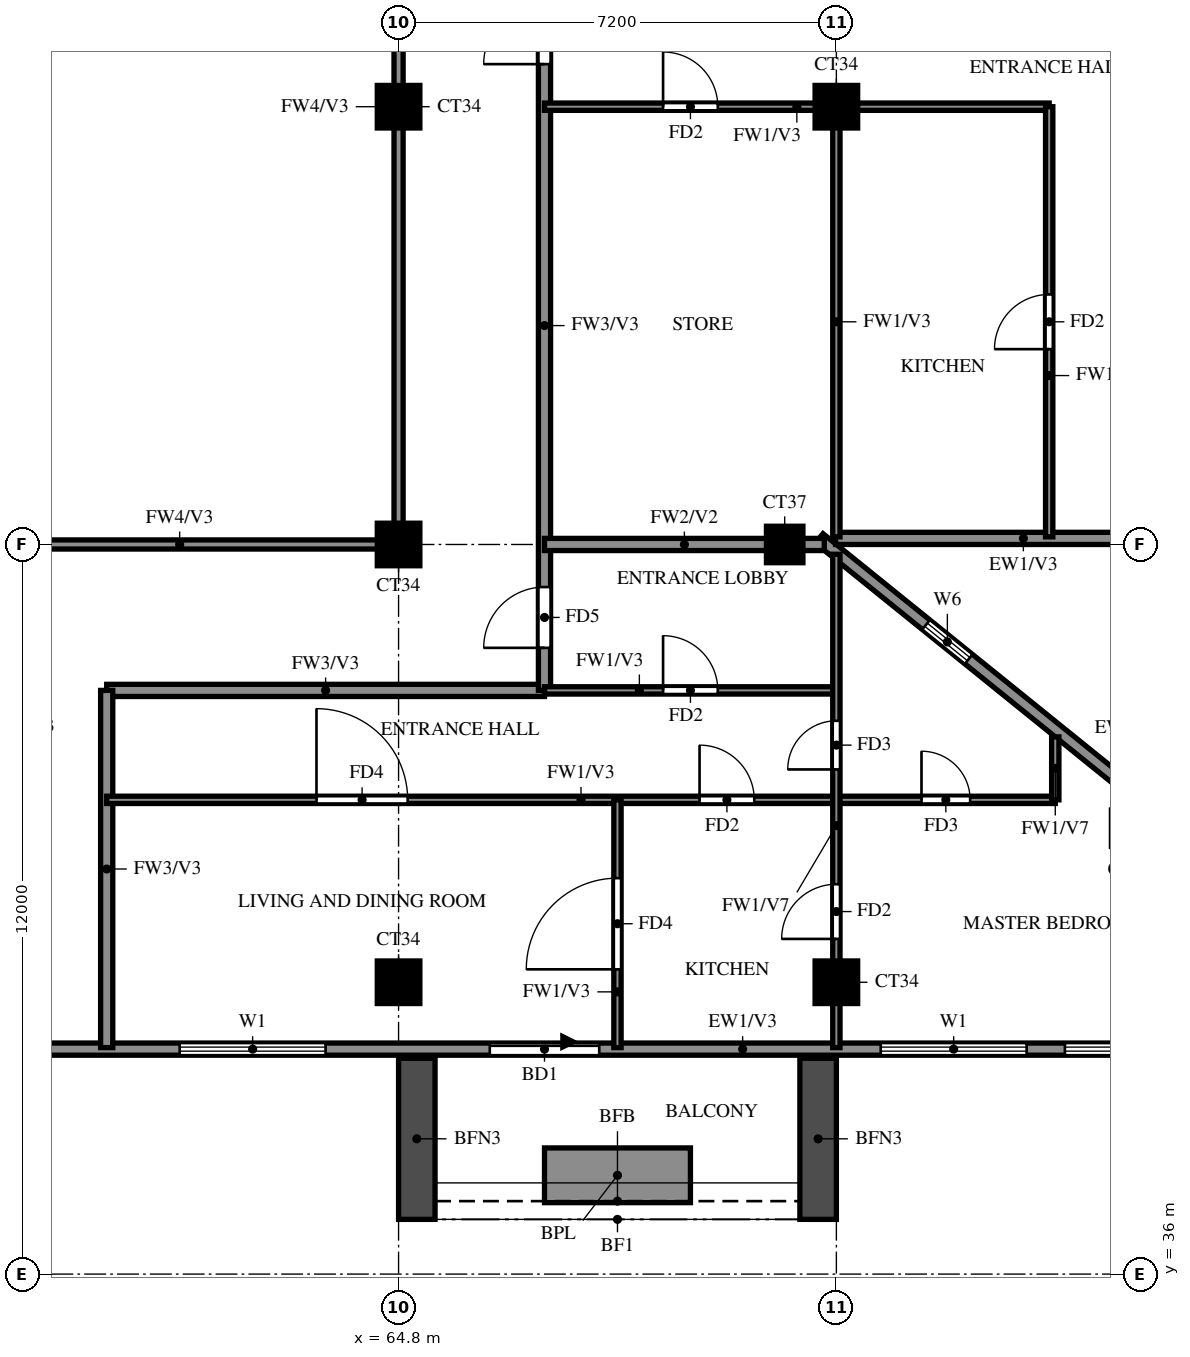
"""IFC4 building model, lengths in metres.
Left out: names, types, materials, properties, quantities, classifications, styles, units other than length and angle.
Written with IfcOpenShell. Run it as: python <this file> out.ifc"""

import sys

from ifc_helpers import new_model, si_unit, direction, frame, frame_2d, origin, origin_2d, place, context, subcontext, project, spatial, rectangle, extrude, source, transform, mapped, element, fill, save


model = new_model("IFC4")
c1 = context("Model", 3, precision=1e-05, world=origin(), true_north=direction((0.0, 1.0)))
c2 = subcontext(c1, "Body", "Model", "MODEL_VIEW")
j1 = project(units=[si_unit("LENGTHUNIT", "METRE"), si_unit("PLANEANGLEUNIT", "RADIAN")], contexts=[c1])
p1 = place(None, origin())
s1 = spatial("IfcSite", under=j1, at=p1, CompositionType="ELEMENT")
p2 = place(p1, origin())
s2 = spatial("IfcBuilding", under=s1, at=p2, CompositionType="ELEMENT")
p3 = place(p2, frame((0.0, 0.0, 253.5)))
s3 = spatial("IfcBuildingStorey", under=s2, at=p3, CompositionType="ELEMENT", Elevation=253.5)
m1 = source(origin(), c2, "Body", "SweptSolid", [
    extrude(rectangle(XDim=0.7, YDim=0.7, at=origin_2d()), origin(), (0.0, 0.0, 1.0), 3.22),
])
for number, where, z_axis, x_axis in (
    (1, (64.8, 40.8, 0.0), (0.0, 0.0, 1.0), (1.0, 0.0, 0.0)),
    (2, (72.0, 40.8, 0.0), (0.0, 0.0, 1.0), (1.0, 0.0, 0.0)),
    (3, (64.8, 48.0, 0.0), (0.0, 0.0, 1.0), (1.0, 0.0, 0.0)),
):
    element("IfcColumn", number, at=place(p3, frame(where, z_axis=z_axis, x_axis=x_axis)), inside=s3, PredefinedType="COLUMN", context=c2, shape_type="MappedRepresentation", body=[
        mapped(m1, transform((0.0, 0.0, 0.0))),
    ])
m2 = source(origin(), c2, "Body", "SweptSolid", [
    extrude(rectangle(XDim=0.6, YDim=0.6, at=origin_2d()), origin(), (0.0, 0.0, 1.0), 3.22),
])
p4 = place(p3, frame((71.15, 48.0, 0.0), z_axis=(0.0, 0.0, 1.0), x_axis=(1.0, 0.0, 0.0)))
e4 = element("IfcColumn", 4, at=p4, inside=s3, PredefinedType="COLUMN", context=c2, shape_type="MappedRepresentation", body=[
    mapped(m2, transform((0.0, 0.0, 0.0))),
])
for number, where, z_axis, x_axis in (
    (5, (64.8, 55.2, 0.0), (0.0, 0.0, 1.0), (1.0, 0.0, 0.0)),
    (6, (72.0, 55.2, 0.0), (0.0, 0.0, 1.0), (1.0, 0.0, 0.0)),
):
    element("IfcColumn", number, at=place(p3, frame(where, z_axis=z_axis, x_axis=x_axis)), inside=s3, PredefinedType="COLUMN", context=c2, shape_type="MappedRepresentation", body=[
        mapped(m1, transform((0.0, 0.0, 0.0))),
    ])
p5 = place(p3, frame((81.907, 39.87, 0.0), z_axis=(0.0, 0.0, 1.0), x_axis=(-0.777936274417, 0.62834318087, 0.0)))
e7 = element("IfcWall", 7, at=p5, inside=s3, PredefinedType="SOLIDWALL", context=c2, shape_type="SweptSolid", body=[
    extrude(rectangle(XDim=13.099, YDim=0.2, at=frame_2d((6.549, 0.0))), origin(), (0.0, 0.0, 1.0), 3.22),
])
p6 = place(p5, frame((9.938, 0.0, 1.5)))
e8 = element("IfcOpeningElement", 8, at=p6, cuts=e7, PredefinedType="OPENING", context=c2, shape_type="SweptSolid", body=[
    extrude(rectangle(XDim=0.9, YDim=0.9, at=frame_2d((0.45, 0.45))), frame((0.0, 0.11, 0.0), z_axis=(0.0, -1.0, 0.0), x_axis=(1.0, 0.0, 0.0)), (0.0, 0.0, 1.0), 0.22),
])
p7 = place(p3, frame((71.987, 48.1, 0.0), z_axis=(0.0, 0.0, 1.0), x_axis=(1.0, 0.0, 0.0)))
e9 = element("IfcWall", 9, at=p7, inside=s3, PredefinedType="SOLIDWALL", context=c2, shape_type="SweptSolid", body=[
    extrude(rectangle(XDim=6.863, YDim=0.2, at=frame_2d((3.432, 0.0))), origin(), (0.0, 0.0, 1.0), 3.22),
])
p8 = place(p3, frame((58.8, 39.7, 0.0), z_axis=(0.0, 0.0, 1.0), x_axis=(1.0, 0.0, 0.0)))
e10 = element("IfcWall", 10, at=p8, inside=s3, PredefinedType="SOLIDWALL", context=c2, shape_type="SweptSolid", body=[
    extrude(rectangle(XDim=23.317, YDim=0.2, at=frame_2d((11.658, 0.0))), origin(), (0.0, 0.0, 1.0), 3.22),
])
p9 = place(p8, frame((7.5, 0.0, 0.0)))
e11 = element("IfcOpeningElement", 11, at=p9, cuts=e10, PredefinedType="OPENING", context=c2, shape_type="SweptSolid", body=[
    extrude(rectangle(XDim=1.8, YDim=2.4, at=frame_2d((0.9, 1.2))), frame((0.0, 0.11, 0.0), z_axis=(0.0, -1.0, 0.0), x_axis=(1.0, 0.0, 0.0)), (0.0, 0.0, 1.0), 0.22),
])
p10 = place(p8, frame((2.4, 0.0, 0.6)))
e12 = element("IfcOpeningElement", 12, at=p10, cuts=e10, PredefinedType="OPENING", context=c2, shape_type="SweptSolid", body=[
    extrude(rectangle(XDim=2.4, YDim=2.4, at=frame_2d((1.2, 1.2))), frame((0.0, 0.11, 0.0), z_axis=(0.0, -1.0, 0.0), x_axis=(1.0, 0.0, 0.0)), (0.0, 0.0, 1.0), 0.22),
])
p11 = place(p8, frame((13.929, 0.0, 0.6)))
e13 = element("IfcOpeningElement", 13, at=p11, cuts=e10, PredefinedType="OPENING", context=c2, shape_type="SweptSolid", body=[
    extrude(rectangle(XDim=2.4, YDim=2.4, at=frame_2d((1.2, 1.2))), frame((0.0, 0.11, 0.0), z_axis=(0.0, -1.0, 0.0), x_axis=(1.0, 0.0, 0.0)), (0.0, 0.0, 1.0), 0.22),
])
p12 = place(p8, frame((16.958, 0.0, 0.6)))
e14 = element("IfcOpeningElement", 14, at=p12, cuts=e10, PredefinedType="OPENING", context=c2, shape_type="SweptSolid", body=[
    extrude(rectangle(XDim=2.4, YDim=2.4, at=frame_2d((1.2, 1.2))), frame((0.0, 0.11, 0.0), z_axis=(0.0, -1.0, 0.0), x_axis=(1.0, 0.0, 0.0)), (0.0, 0.0, 1.0), 0.22),
])
p13 = place(p8, frame((19.988, 0.0, 0.6)))
e15 = element("IfcOpeningElement", 15, at=p13, cuts=e10, PredefinedType="OPENING", context=c2, shape_type="SweptSolid", body=[
    extrude(rectangle(XDim=2.4, YDim=2.4, at=frame_2d((1.2, 1.2))), frame((0.0, 0.11, 0.0), z_axis=(0.0, -1.0, 0.0), x_axis=(1.0, 0.0, 0.0)), (0.0, 0.0, 1.0), 0.22),
])
for number, where, z_axis, x_axis in (
    (16, (65.1, 39.55, 0.0), (0.0, 0.0, 1.0), (0.0, -1.0, 0.0)),
    (17, (71.7, 39.55, 0.0), (0.0, 0.0, 1.0), (0.0, -1.0, 0.0)),
):
    element("IfcWall", number, at=place(p3, frame(where, z_axis=z_axis, x_axis=x_axis)), inside=s3, PredefinedType="SOLIDWALL", context=c2, shape_type="SweptSolid", body=[
        extrude(rectangle(XDim=2.65, YDim=0.6, at=frame_2d((1.325, 0.0))), origin(), (0.0, 0.0, 1.0), 2.85),
    ])
p14 = place(p3, frame((67.2, 37.625, 0.0), z_axis=(0.0, 0.0, 1.0), x_axis=(1.0, 0.0, 0.0)))
e18 = element("IfcWall", 18, at=p14, inside=s3, PredefinedType="SOLIDWALL", context=c2, shape_type="SweptSolid", body=[
    extrude(rectangle(XDim=2.4, YDim=0.9, at=frame_2d((1.2, 0.0))), origin(), (0.0, 0.0, 1.0), 0.9),
])
p15 = place(p3, frame((60.0, 45.6, 0.0), z_axis=(0.0, 0.0, 1.0), x_axis=(1.0, 0.0, 0.0)))
e19 = element("IfcWall", 19, at=p15, inside=s3, PredefinedType="SOLIDWALL", context=c2, shape_type="SweptSolid", body=[
    extrude(rectangle(XDim=7.2, YDim=0.2, at=frame_2d((3.6, 0.0))), origin(), (0.0, 0.0, 1.0), 3.22),
])
p16 = place(p3, frame((60.0, 39.725, 0.0), z_axis=(0.0, 0.0, 1.0), x_axis=(0.0, 1.0, 0.0)))
e20 = element("IfcWall", 20, at=p16, inside=s3, PredefinedType="SOLIDWALL", context=c2, shape_type="SweptSolid", body=[
    extrude(rectangle(XDim=5.875, YDim=0.2, at=frame_2d((2.938, 0.0))), origin(), (0.0, 0.0, 1.0), 3.22),
])
p17 = place(p3, frame((67.2, 45.6, 0.0), z_axis=(0.0, 0.0, 1.0), x_axis=(0.0, 1.0, 0.0)))
e21 = element("IfcWall", 21, at=p17, inside=s3, PredefinedType="SOLIDWALL", context=c2, shape_type="SweptSolid", body=[
    extrude(rectangle(XDim=12.0, YDim=0.2, at=frame_2d((6.0, 0.0))), origin(), (0.0, 0.0, 1.0), 3.22),
])
p18 = place(p17, frame((10.3, 0.0, 0.0)))
e22 = element("IfcOpeningElement", 22, at=p18, cuts=e21, PredefinedType="OPENING", context=c2, shape_type="SweptSolid", body=[
    extrude(rectangle(XDim=1.0, YDim=2.1, at=frame_2d((0.5, 1.05))), frame((0.0, 0.11, 0.0), z_axis=(0.0, -1.0, 0.0), x_axis=(1.0, 0.0, 0.0)), (0.0, 0.0, 1.0), 0.22),
])
p19 = place(p17, frame((0.7, 0.0, 0.0)))
e23 = element("IfcOpeningElement", 23, at=p19, cuts=e21, PredefinedType="OPENING", context=c2, shape_type="SweptSolid", body=[
    extrude(rectangle(XDim=1.0, YDim=2.1, at=frame_2d((0.5, 1.05))), frame((0.0, 0.11, 0.0), z_axis=(0.0, -1.0, 0.0), x_axis=(1.0, 0.0, 0.0)), (0.0, 0.0, 1.0), 0.22),
])
p20 = place(p3, frame((67.2, 48.0, 0.0), z_axis=(0.0, 0.0, 1.0), x_axis=(1.0, 0.0, 0.0)))
e24 = element("IfcWall", 24, at=p20, inside=s3, PredefinedType="SOLIDWALL", context=c2, shape_type="SweptSolid", body=[
    extrude(rectangle(XDim=4.601, YDim=0.2, at=frame_2d((2.301, 0.0))), origin(), (0.0, 0.0, 1.0), 3.22),
])
p21 = place(p3, frame((60.0, 43.8, 0.0), z_axis=(0.0, 0.0, 1.0), x_axis=(1.0, 0.0, 0.0)))
e25 = element("IfcWall", 25, at=p21, inside=s3, PredefinedType="PARTITIONING", context=c2, shape_type="SweptSolid", body=[
    extrude(rectangle(XDim=15.6, YDim=0.12, at=frame_2d((7.8, 0.0))), origin(), (0.0, 0.0, 1.0), 3.22),
])
p22 = place(p21, frame((9.75, 0.0, 0.0)))
e26 = element("IfcOpeningElement", 26, at=p22, cuts=e25, PredefinedType="OPENING", context=c2, shape_type="SweptSolid", body=[
    extrude(rectangle(XDim=0.9, YDim=2.1, at=frame_2d((0.45, 1.05))), frame((0.0, 0.07, 0.0), z_axis=(0.0, -1.0, 0.0), x_axis=(1.0, 0.0, 0.0)), (0.0, 0.0, 1.0), 0.14),
])
p23 = place(p21, frame((3.45, 0.0, 0.0)))
e27 = element("IfcOpeningElement", 27, at=p23, cuts=e25, PredefinedType="OPENING", context=c2, shape_type="SweptSolid", body=[
    extrude(rectangle(XDim=1.5, YDim=2.1, at=frame_2d((0.75, 1.05))), frame((0.0, 0.07, 0.0), z_axis=(0.0, -1.0, 0.0), x_axis=(1.0, 0.0, 0.0)), (0.0, 0.0, 1.0), 0.14),
])
p24 = place(p21, frame((13.4, 0.0, 0.0)))
e28 = element("IfcOpeningElement", 28, at=p24, cuts=e25, PredefinedType="OPENING", context=c2, shape_type="SweptSolid", body=[
    extrude(rectangle(XDim=0.8, YDim=2.1, at=frame_2d((0.4, 1.05))), frame((0.0, 0.07, 0.0), z_axis=(0.0, -1.0, 0.0), x_axis=(1.0, 0.0, 0.0)), (0.0, 0.0, 1.0), 0.14),
])
p25 = place(p3, frame((67.2, 45.6, 0.0), z_axis=(0.0, 0.0, 1.0), x_axis=(1.0, 0.0, 0.0)))
e29 = element("IfcWall", 29, at=p25, inside=s3, PredefinedType="PARTITIONING", context=c2, shape_type="SweptSolid", body=[
    extrude(rectangle(XDim=4.8, YDim=0.12, at=frame_2d((2.4, 0.0))), origin(), (0.0, 0.0, 1.0), 3.22),
])
p26 = place(p25, frame((1.95, 0.0, 0.0)))
e30 = element("IfcOpeningElement", 30, at=p26, cuts=e29, PredefinedType="OPENING", context=c2, shape_type="SweptSolid", body=[
    extrude(rectangle(XDim=0.9, YDim=2.1, at=frame_2d((0.45, 1.05))), frame((0.0, 0.07, 0.0), z_axis=(0.0, -1.0, 0.0), x_axis=(1.0, 0.0, 0.0)), (0.0, 0.0, 1.0), 0.14),
])
p27 = place(p3, frame((67.2, 55.2, 0.0), z_axis=(0.0, 0.0, 1.0), x_axis=(1.0, 0.0, 0.0)))
e31 = element("IfcWall", 31, at=p27, inside=s3, PredefinedType="PARTITIONING", context=c2, shape_type="SweptSolid", body=[
    extrude(rectangle(XDim=8.3, YDim=0.12, at=frame_2d((4.15, 0.0))), origin(), (0.0, 0.0, 1.0), 3.22),
])
p28 = place(p27, frame((1.95, 0.0, 0.0)))
e32 = element("IfcOpeningElement", 32, at=p28, cuts=e31, PredefinedType="OPENING", context=c2, shape_type="SweptSolid", body=[
    extrude(rectangle(XDim=0.9, YDim=2.1, at=frame_2d((0.45, 1.05))), frame((0.0, 0.07, 0.0), z_axis=(0.0, -1.0, 0.0), x_axis=(1.0, 0.0, 0.0)), (0.0, 0.0, 1.0), 0.14),
])
p29 = place(p3, frame((68.4, 39.725, 0.0), z_axis=(0.0, 0.0, 1.0), x_axis=(0.0, 1.0, 0.0)))
e33 = element("IfcWall", 33, at=p29, inside=s3, PredefinedType="PARTITIONING", context=c2, shape_type="SweptSolid", body=[
    extrude(rectangle(XDim=4.075, YDim=0.12, at=frame_2d((2.038, 0.0))), origin(), (0.0, 0.0, 1.0), 3.22),
])
p30 = place(p29, frame((1.288, 0.0, 0.0)))
e34 = element("IfcOpeningElement", 34, at=p30, cuts=e33, PredefinedType="OPENING", context=c2, shape_type="SweptSolid", body=[
    extrude(rectangle(XDim=1.5, YDim=2.1, at=frame_2d((0.75, 1.05))), frame((0.0, 0.07, 0.0), z_axis=(0.0, -1.0, 0.0), x_axis=(1.0, 0.0, 0.0)), (0.0, 0.0, 1.0), 0.14),
])
p31 = place(p3, frame((72.0, 39.725, 0.0), z_axis=(0.0, 0.0, 1.0), x_axis=(0.0, 1.0, 0.0)))
e35 = element("IfcWall", 35, at=p31, inside=s3, PredefinedType="PARTITIONING", context=c2, shape_type="SweptSolid", body=[
    extrude(rectangle(XDim=8.114, YDim=0.12, at=frame_2d((4.057, 0.0))), origin(), (0.0, 0.0, 1.0), 2.32),
])
p32 = place(p31, frame((1.788, 0.0, 0.0)))
e36 = element("IfcOpeningElement", 36, at=p32, cuts=e35, PredefinedType="OPENING", context=c2, shape_type="SweptSolid", body=[
    extrude(rectangle(XDim=0.9, YDim=2.1, at=frame_2d((0.45, 1.05))), frame((0.0, 0.07, 0.0), z_axis=(0.0, -1.0, 0.0), x_axis=(1.0, 0.0, 0.0)), (0.0, 0.0, 1.0), 0.14),
])
p33 = place(p31, frame((4.575, 0.0, 0.0)))
e37 = element("IfcOpeningElement", 37, at=p33, cuts=e35, PredefinedType="OPENING", context=c2, shape_type="SweptSolid", body=[
    extrude(rectangle(XDim=0.8, YDim=2.1, at=frame_2d((0.4, 1.05))), frame((0.0, 0.07, 0.0), z_axis=(0.0, -1.0, 0.0), x_axis=(1.0, 0.0, 0.0)), (0.0, 0.0, 1.0), 0.14),
])
p34 = place(p3, frame((72.0, 48.125, 0.0), z_axis=(0.0, 0.0, 1.0), x_axis=(0.0, 1.0, 0.0)))
e38 = element("IfcWall", 38, at=p34, inside=s3, PredefinedType="PARTITIONING", context=c2, shape_type="SweptSolid", body=[
    extrude(rectangle(XDim=7.075, YDim=0.12, at=frame_2d((3.538, 0.0))), origin(), (0.0, 0.0, 1.0), 3.22),
])
p35 = place(p3, frame((75.5, 48.125, 0.0), z_axis=(0.0, 0.0, 1.0), x_axis=(0.0, 1.0, 0.0)))
e39 = element("IfcWall", 39, at=p35, inside=s3, PredefinedType="PARTITIONING", context=c2, shape_type="SweptSolid", body=[
    extrude(rectangle(XDim=7.075, YDim=0.12, at=frame_2d((3.538, 0.0))), origin(), (0.0, 0.0, 1.0), 3.22),
])
p36 = place(p35, frame((3.087, 0.0, 0.0)))
e40 = element("IfcOpeningElement", 40, at=p36, cuts=e39, PredefinedType="OPENING", context=c2, shape_type="SweptSolid", body=[
    extrude(rectangle(XDim=0.9, YDim=2.1, at=frame_2d((0.45, 1.05))), frame((0.0, 0.07, 0.0), z_axis=(0.0, -1.0, 0.0), x_axis=(1.0, 0.0, 0.0)), (0.0, 0.0, 1.0), 0.14),
])
p37 = place(p3, frame((75.6, 43.8, 0.0), z_axis=(0.0, 0.0, 1.0), x_axis=(0.0, 1.0, 0.0)))
e41 = element("IfcWall", 41, at=p37, inside=s3, PredefinedType="PARTITIONING", context=c2, shape_type="SweptSolid", body=[
    extrude(rectangle(XDim=1.035, YDim=0.12, at=frame_2d((0.518, 0.0))), origin(), (0.0, 0.0, 1.0), 2.32),
])
p38 = place(p3, frame((57.6, 48.0, 0.0), z_axis=(0.0, 0.0, 1.0), x_axis=(1.0, 0.0, 0.0)))
e42 = element("IfcWall", 42, at=p38, inside=s3, PredefinedType="SOLIDWALL", context=c2, shape_type="SweptSolid", body=[
    extrude(rectangle(XDim=7.2, YDim=0.15, at=frame_2d((3.6, 0.0))), origin(), (0.0, 0.0, 1.0), 2.32),
])
p39 = place(p3, frame((64.8, 48.0, 0.0), z_axis=(0.0, 0.0, 1.0), x_axis=(0.0, 1.0, 0.0)))
e43 = element("IfcWall", 43, at=p39, inside=s3, PredefinedType="SOLIDWALL", context=c2, shape_type="SweptSolid", body=[
    extrude(rectangle(XDim=14.4, YDim=0.15, at=frame_2d((7.2, 0.0))), origin(), (0.0, 0.0, 1.0), 2.32),
])
p40 = place(p6, origin())
e44 = element("IfcWindow", 44, at=p40, inside=s3, PartitioningType="SINGLE_PANEL", PredefinedType="WINDOW", context=c2, shape_type="SweptSolid", body=[
    extrude(rectangle(XDim=0.9, YDim=0.9, at=frame_2d((0.45, 0.45))), frame((0.0, 0.03, 0.0), z_axis=(0.0, -1.0, 0.0), x_axis=(1.0, 0.0, 0.0)), (0.0, 0.0, 1.0), 0.06),
])
fill(e8, e44)
p41 = place(p9, origin())
e45 = element("IfcDoor", 45, at=p41, inside=s3, OperationType="DOUBLE_DOOR_SLIDING", PredefinedType="DOOR", context=c2, shape_type="SweptSolid", body=[
    extrude(rectangle(XDim=1.8, YDim=2.4, at=frame_2d((0.9, 1.2))), frame((0.0, 0.025, 0.0), z_axis=(0.0, -1.0, 0.0), x_axis=(1.0, 0.0, 0.0)), (0.0, 0.0, 1.0), 0.05),
])
fill(e11, e45)
p42 = place(p10, origin())
e46 = element("IfcWindow", 46, at=p42, inside=s3, PartitioningType="DOUBLE_PANEL_VERTICAL", PredefinedType="WINDOW", context=c2, shape_type="SweptSolid", body=[
    extrude(rectangle(XDim=2.4, YDim=2.4, at=frame_2d((1.2, 1.2))), frame((0.0, 0.03, 0.0), z_axis=(0.0, -1.0, 0.0), x_axis=(1.0, 0.0, 0.0)), (0.0, 0.0, 1.0), 0.06),
])
fill(e12, e46)
p43 = place(p11, origin())
e47 = element("IfcWindow", 47, at=p43, inside=s3, PartitioningType="DOUBLE_PANEL_VERTICAL", PredefinedType="WINDOW", context=c2, shape_type="SweptSolid", body=[
    extrude(rectangle(XDim=2.4, YDim=2.4, at=frame_2d((1.2, 1.2))), frame((0.0, 0.03, 0.0), z_axis=(0.0, -1.0, 0.0), x_axis=(1.0, 0.0, 0.0)), (0.0, 0.0, 1.0), 0.06),
])
fill(e13, e47)
p44 = place(p12, origin())
e48 = element("IfcWindow", 48, at=p44, inside=s3, PartitioningType="DOUBLE_PANEL_VERTICAL", PredefinedType="WINDOW", context=c2, shape_type="SweptSolid", body=[
    extrude(rectangle(XDim=2.4, YDim=2.4, at=frame_2d((1.2, 1.2))), frame((0.0, 0.03, 0.0), z_axis=(0.0, -1.0, 0.0), x_axis=(1.0, 0.0, 0.0)), (0.0, 0.0, 1.0), 0.06),
])
fill(e14, e48)
p45 = place(p18, origin())
e49 = element("IfcDoor", 49, at=p45, inside=s3, OperationType="SINGLE_SWING_LEFT", PredefinedType="DOOR", context=c2, shape_type="SweptSolid", body=[
    extrude(rectangle(XDim=1.0, YDim=2.1, at=frame_2d((0.5, 1.05))), frame((0.0, 0.025, 0.0), z_axis=(0.0, -1.0, 0.0), x_axis=(1.0, 0.0, 0.0)), (0.0, 0.0, 1.0), 0.05),
])
fill(e22, e49)
p46 = place(p36, origin())
e50 = element("IfcDoor", 50, at=p46, inside=s3, OperationType="SINGLE_SWING_RIGHT", PredefinedType="DOOR", context=c2, shape_type="SweptSolid", body=[
    extrude(rectangle(XDim=0.9, YDim=2.1, at=frame_2d((0.45, 1.05))), frame((0.0, 0.025, 0.0), z_axis=(0.0, -1.0, 0.0), x_axis=(1.0, 0.0, 0.0)), (0.0, 0.0, 1.0), 0.05),
])
fill(e40, e50)
p47 = place(p28, origin())
e51 = element("IfcDoor", 51, at=p47, inside=s3, OperationType="SINGLE_SWING_LEFT", PredefinedType="DOOR", context=c2, shape_type="SweptSolid", body=[
    extrude(rectangle(XDim=0.9, YDim=2.1, at=frame_2d((0.45, 1.05))), frame((0.0, 0.025, 0.0), z_axis=(0.0, -1.0, 0.0), x_axis=(1.0, 0.0, 0.0)), (0.0, 0.0, 1.0), 0.05),
])
fill(e32, e51)
p48 = place(p30, origin())
e52 = element("IfcDoor", 52, at=p48, inside=s3, OperationType="SINGLE_SWING_LEFT", PredefinedType="DOOR", context=c2, shape_type="SweptSolid", body=[
    extrude(rectangle(XDim=1.5, YDim=2.1, at=frame_2d((0.75, 1.05))), frame((0.0, 0.025, 0.0), z_axis=(0.0, -1.0, 0.0), x_axis=(1.0, 0.0, 0.0)), (0.0, 0.0, 1.0), 0.05),
])
fill(e34, e52)
p49 = place(p26, origin())
e53 = element("IfcDoor", 53, at=p49, inside=s3, OperationType="SINGLE_SWING_RIGHT", PredefinedType="DOOR", context=c2, shape_type="SweptSolid", body=[
    extrude(rectangle(XDim=0.9, YDim=2.1, at=frame_2d((0.45, 1.05))), frame((0.0, 0.025, 0.0), z_axis=(0.0, -1.0, 0.0), x_axis=(1.0, 0.0, 0.0)), (0.0, 0.0, 1.0), 0.05),
])
fill(e30, e53)
p50 = place(p19, origin())
e54 = element("IfcDoor", 54, at=p50, inside=s3, OperationType="SINGLE_SWING_LEFT", PredefinedType="DOOR", context=c2, shape_type="SweptSolid", body=[
    extrude(rectangle(XDim=1.0, YDim=2.1, at=frame_2d((0.5, 1.05))), frame((0.0, 0.025, 0.0), z_axis=(0.0, -1.0, 0.0), x_axis=(1.0, 0.0, 0.0)), (0.0, 0.0, 1.0), 0.05),
])
fill(e23, e54)
p51 = place(p22, origin())
e55 = element("IfcDoor", 55, at=p51, inside=s3, OperationType="SINGLE_SWING_LEFT", PredefinedType="DOOR", context=c2, shape_type="SweptSolid", body=[
    extrude(rectangle(XDim=0.9, YDim=2.1, at=frame_2d((0.45, 1.05))), frame((0.0, 0.025, 0.0), z_axis=(0.0, -1.0, 0.0), x_axis=(1.0, 0.0, 0.0)), (0.0, 0.0, 1.0), 0.05),
])
fill(e26, e55)
p52 = place(p23, origin())
e56 = element("IfcDoor", 56, at=p52, inside=s3, OperationType="SINGLE_SWING_RIGHT", PredefinedType="DOOR", context=c2, shape_type="SweptSolid", body=[
    extrude(rectangle(XDim=1.5, YDim=2.1, at=frame_2d((0.75, 1.05))), frame((0.0, 0.025, 0.0), z_axis=(0.0, -1.0, 0.0), x_axis=(1.0, 0.0, 0.0)), (0.0, 0.0, 1.0), 0.05),
])
fill(e27, e56)
p53 = place(p32, origin())
e57 = element("IfcDoor", 57, at=p53, inside=s3, OperationType="SINGLE_SWING_RIGHT", PredefinedType="DOOR", context=c2, shape_type="SweptSolid", body=[
    extrude(rectangle(XDim=0.9, YDim=2.1, at=frame_2d((0.45, 1.05))), frame((0.0, 0.025, 0.0), z_axis=(0.0, -1.0, 0.0), x_axis=(1.0, 0.0, 0.0)), (0.0, 0.0, 1.0), 0.05),
])
fill(e36, e57)
p54 = place(p33, origin())
e58 = element("IfcDoor", 58, at=p54, inside=s3, OperationType="SINGLE_SWING_LEFT", PredefinedType="DOOR", context=c2, shape_type="SweptSolid", body=[
    extrude(rectangle(XDim=0.8, YDim=2.1, at=frame_2d((0.4, 1.05))), frame((0.0, 0.025, 0.0), z_axis=(0.0, -1.0, 0.0), x_axis=(1.0, 0.0, 0.0)), (0.0, 0.0, 1.0), 0.05),
])
fill(e37, e58)
p55 = place(p24, origin())
e59 = element("IfcDoor", 59, at=p55, inside=s3, OperationType="SINGLE_SWING_RIGHT", PredefinedType="DOOR", context=c2, shape_type="SweptSolid", body=[
    extrude(rectangle(XDim=0.8, YDim=2.1, at=frame_2d((0.4, 1.05))), frame((0.0, 0.025, 0.0), z_axis=(0.0, -1.0, 0.0), x_axis=(1.0, 0.0, 0.0)), (0.0, 0.0, 1.0), 0.05),
])
fill(e28, e59)
save(model, sys.argv[1])
